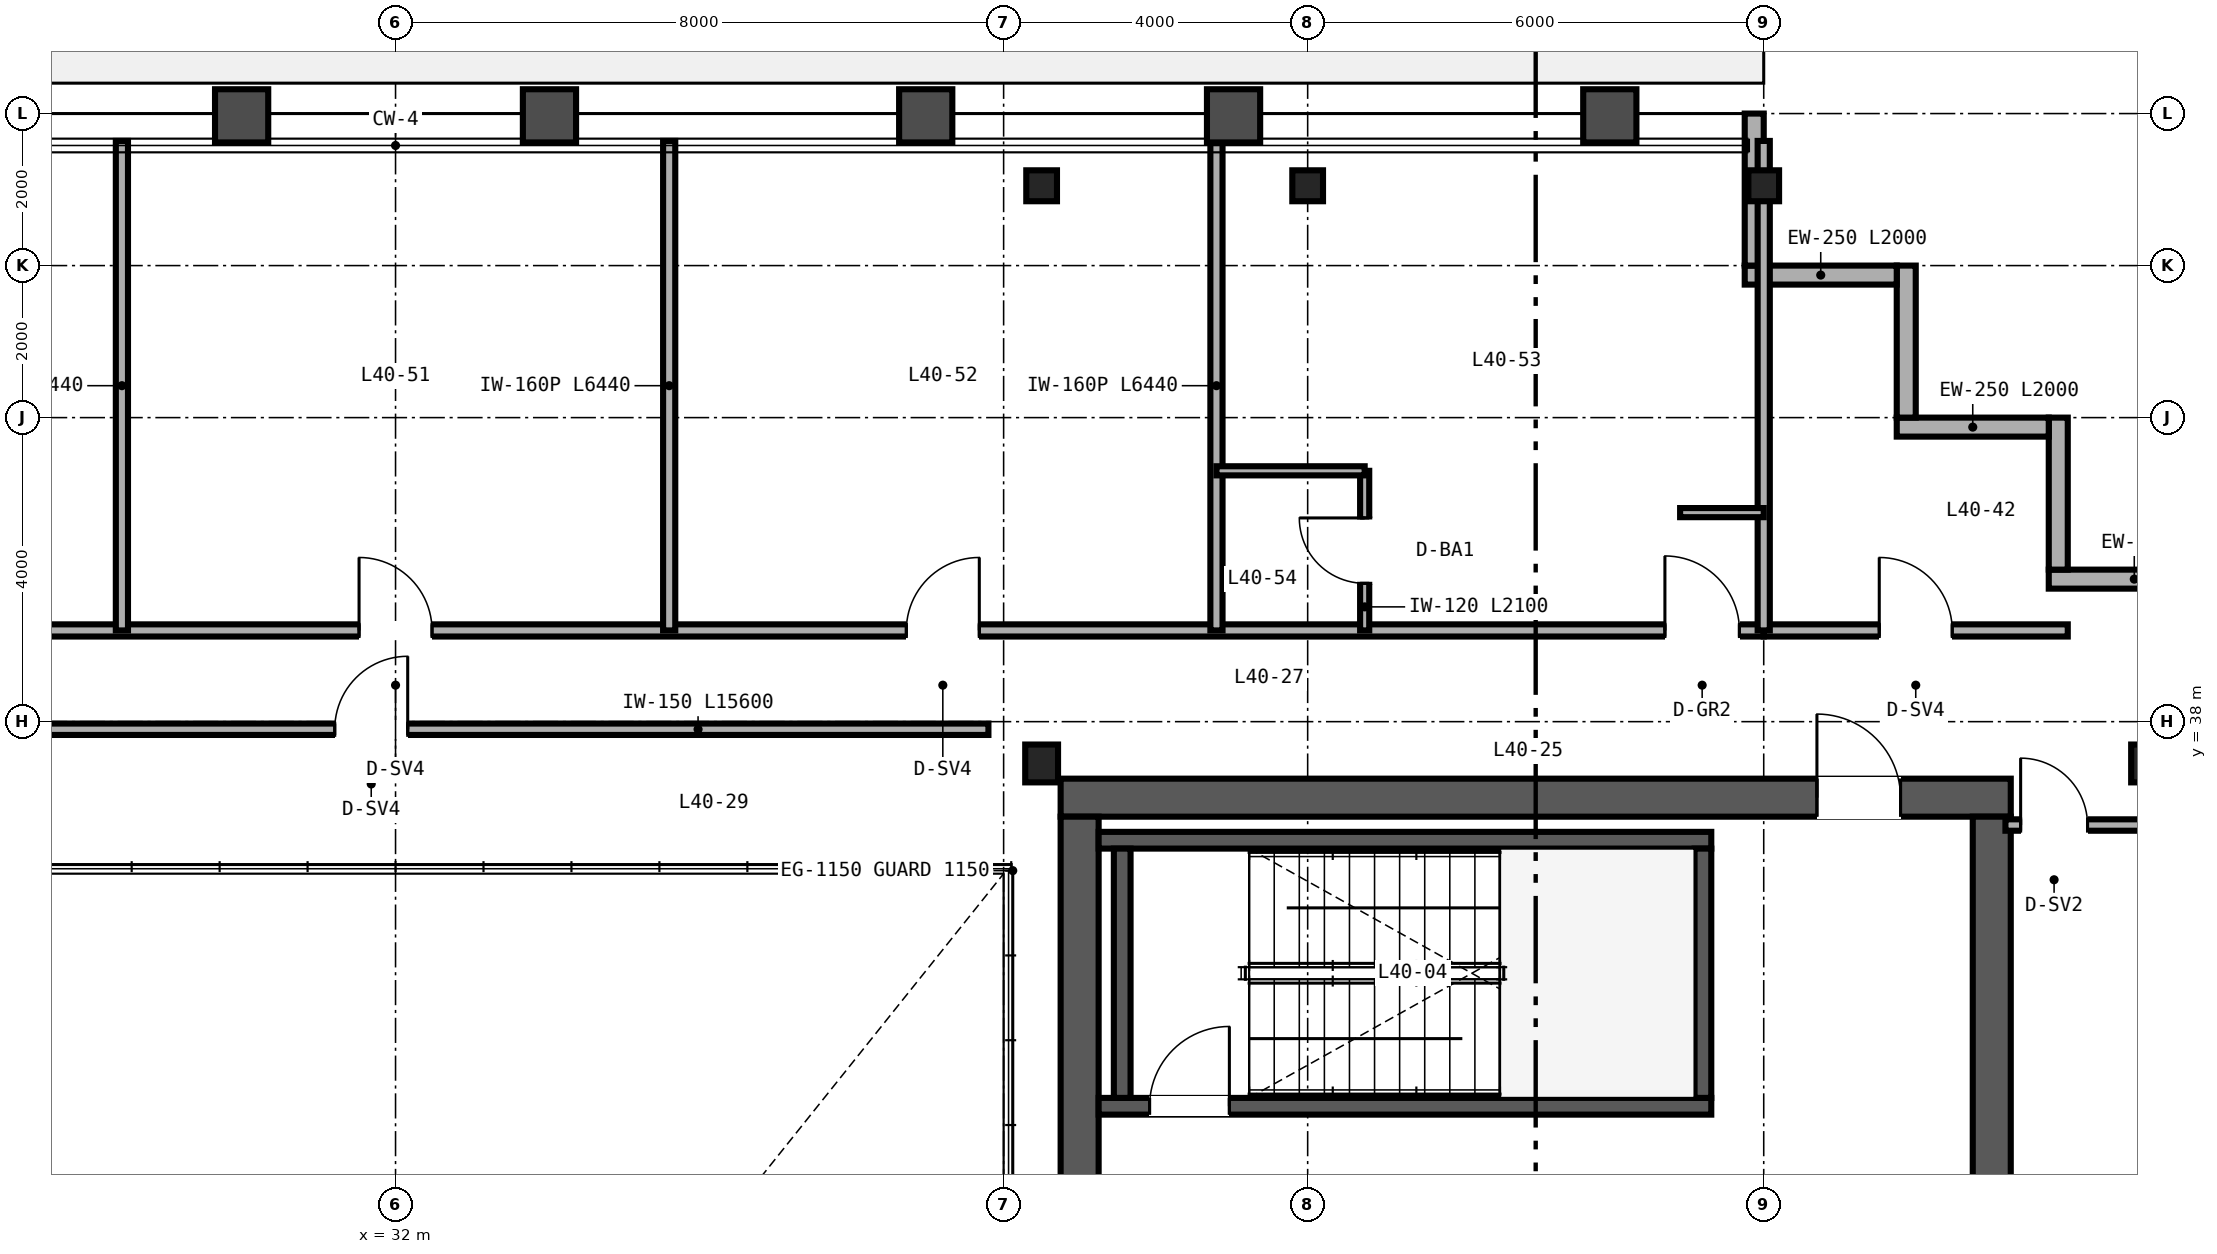
"""IFC4 building model, lengths in metres.
Left out: names, types, materials, properties, quantities, classifications, styles, units other than length and angle.
Written with IfcOpenShell. Run it as: python <this file> out.ifc"""

import sys

from ifc_helpers import new_model, si_unit, direction, frame, frame_2d, origin, origin_2d, place, context, subcontext, project, spatial, rectangle, i_section, extrude, source, transform, mapped, element, fill, save


model = new_model("IFC4")
c1 = context("Model", 3, precision=1e-05, world=origin(), true_north=direction((0.0, 1.0)))
c2 = subcontext(c1, "Body", "Model", "MODEL_VIEW")
j1 = project(units=[si_unit("LENGTHUNIT", "METRE"), si_unit("PLANEANGLEUNIT", "RADIAN")], contexts=[c1])
p1 = place(None, origin())
s1 = spatial("IfcSite", under=j1, at=p1, CompositionType="ELEMENT")
p2 = place(p1, origin())
s2 = spatial("IfcBuilding", under=s1, at=p2, CompositionType="ELEMENT")
p3 = place(p2, frame((0.0, 0.0, 163.2)))
s3 = spatial("IfcBuildingStorey", under=s2, at=p3, CompositionType="ELEMENT", Elevation=163.2)
p4 = place(p3, frame((40.75, 37.0, 0.0), z_axis=(0.0, 0.0, 1.0), x_axis=(1.0, 0.0, 0.0)))
e1 = element("IfcWall", 1, at=p4, inside=s3, PredefinedType="SHEAR", context=c2, shape_type="SweptSolid", body=[
    extrude(rectangle(XDim=12.5, YDim=0.5, at=frame_2d((6.25, 0.0))), origin(), (0.0, 0.0, 1.0), 3.37),
])
p5 = place(p4, frame((9.95, 0.0, 0.0)))
e2 = element("IfcOpeningElement", 2, at=p5, cuts=e1, PredefinedType="OPENING", context=c2, shape_type="SweptSolid", body=[
    extrude(rectangle(XDim=1.1, YDim=2.15, at=frame_2d((0.55, 1.075))), frame((0.0, 0.26, 0.0), z_axis=(0.0, -1.0, 0.0), x_axis=(1.0, 0.0, 0.0)), (0.0, 0.0, 1.0), 0.52),
])
for number, where, z_axis, x_axis in (
    (3, (41.0, 15.25, 0.0), (0.0, 0.0, 1.0), (0.0, 1.0, 0.0)),
    (4, (53.0, 15.25, 0.0), (0.0, 0.0, 1.0), (0.0, 1.0, 0.0)),
):
    element("IfcWall", number, at=place(p3, frame(where, z_axis=z_axis, x_axis=x_axis)), inside=s3, PredefinedType="SHEAR", context=c2, shape_type="SweptSolid", body=[
        extrude(rectangle(XDim=21.5, YDim=0.5, at=frame_2d((10.75, 0.0))), origin(), (0.0, 0.0, 1.0), 3.37),
    ])
p6 = place(p3, frame((41.25, 32.94, 0.0), z_axis=(0.0, 0.0, 1.0), x_axis=(1.0, 0.0, 0.0)))
e5 = element("IfcWall", 5, at=p6, inside=s3, PredefinedType="SHEAR", context=c2, shape_type="SweptSolid", body=[
    extrude(rectangle(XDim=8.06, YDim=0.22, at=frame_2d((4.03, 0.0))), origin(), (0.0, 0.0, 1.0), 3.4),
])
p7 = place(p6, frame((0.67, 0.0, 0.0)))
e6 = element("IfcOpeningElement", 6, at=p7, cuts=e5, PredefinedType="OPENING", context=c2, shape_type="SweptSolid", body=[
    extrude(rectangle(XDim=1.05, YDim=2.15, at=frame_2d((0.525, 1.075))), frame((0.0, 0.12, 0.0), z_axis=(0.0, -1.0, 0.0), x_axis=(1.0, 0.0, 0.0)), (0.0, 0.0, 1.0), 0.24),
])
p8 = place(p3, frame((41.25, 36.44, 0.0), z_axis=(0.0, 0.0, 1.0), x_axis=(1.0, 0.0, 0.0)))
e7 = element("IfcWall", 7, at=p8, inside=s3, PredefinedType="SHEAR", context=c2, shape_type="SweptSolid", body=[
    extrude(rectangle(XDim=8.06, YDim=0.22, at=frame_2d((4.03, 0.0))), origin(), (0.0, 0.0, 1.0), 3.4),
])
for number, where, z_axis, x_axis in (
    (8, (41.56, 33.05, 0.0), (0.0, 0.0, 1.0), (0.0, 1.0, 0.0)),
    (9, (49.2, 33.05, 0.0), (0.0, 0.0, 1.0), (0.0, 1.0, 0.0)),
):
    element("IfcWall", number, at=place(p3, frame(where, z_axis=z_axis, x_axis=x_axis)), inside=s3, PredefinedType="SHEAR", context=c2, shape_type="SweptSolid", body=[
        extrude(rectangle(XDim=3.28, YDim=0.22, at=frame_2d((1.64, 0.0))), origin(), (0.0, 0.0, 1.0), 3.4),
    ])
m1 = source(origin(), c2, "Body", "SweptSolid", [
    extrude(i_section(OverallWidth=0.432, OverallDepth=0.498, WebThickness=0.056, FlangeThickness=0.089, FilletRadius=0.025, at=origin_2d()), origin(), (0.0, 0.0, 1.0), 3.37),
])
for number, where, z_axis, x_axis in (
    (10, (40.5, 37.45, 0.0), (0.0, 0.0, 1.0), (1.0, 0.0, 0.0)),
    (11, (55.05, 37.45, 0.0), (0.0, 0.0, 1.0), (1.0, 0.0, 0.0)),
):
    element("IfcColumn", number, at=place(p3, frame(where, z_axis=z_axis, x_axis=x_axis)), inside=s3, PredefinedType="COLUMN", context=c2, shape_type="MappedRepresentation", body=[
        mapped(m1, transform((0.0, 0.0, 0.0), scale=1.0)),
    ])
m2 = source(origin(), c2, "Body", "SweptSolid", [
    extrude(i_section(OverallWidth=0.404, OverallDepth=0.407, WebThickness=0.027, FlangeThickness=0.044, FilletRadius=0.025, at=origin_2d()), origin(), (0.0, 0.0, 1.0), 3.37),
])
for number, where, z_axis, x_axis in (
    (12, (40.5, 45.05, 0.0), (0.0, 0.0, 1.0), (1.0, 0.0, 0.0)),
    (13, (44.0, 45.05, 0.0), (0.0, 0.0, 1.0), (1.0, 0.0, 0.0)),
    (14, (50.0, 45.05, 0.0), (0.0, 0.0, 1.0), (1.0, 0.0, 0.0)),
):
    element("IfcColumn", number, at=place(p3, frame(where, z_axis=z_axis, x_axis=x_axis)), inside=s3, PredefinedType="COLUMN", context=c2, shape_type="MappedRepresentation", body=[
        mapped(m2, transform((0.0, 0.0, 0.0), scale=1.0)),
    ])
p9 = place(p3, frame((56.0, 39.875, 0.0), z_axis=(0.0, 0.0, 1.0), x_axis=(-1.0, 0.0, 0.0)))
e15 = element("IfcWall", 15, at=p9, inside=s3, PredefinedType="SOLIDWALL", context=c2, shape_type="SweptSolid", body=[
    extrude(rectangle(XDim=2.25, YDim=0.25, at=frame_2d((1.125, 0.0))), origin(), (0.0, 0.0, 1.0), 3.37),
])
for number, where, z_axis, x_axis in (
    (16, (53.875, 40.0, 0.0), (0.0, 0.0, 1.0), (0.0, 1.0, 0.0)),
    (17, (53.75, 41.875, 0.0), (0.0, 0.0, 1.0), (-1.0, 0.0, 0.0)),
    (18, (51.875, 42.0, 0.0), (0.0, 0.0, 1.0), (0.0, 1.0, 0.0)),
    (19, (51.75, 43.875, 0.0), (0.0, 0.0, 1.0), (-1.0, 0.0, 0.0)),
):
    element("IfcWall", number, at=place(p3, frame(where, z_axis=z_axis, x_axis=x_axis)), inside=s3, PredefinedType="SOLIDWALL", context=c2, shape_type="SweptSolid", body=[
        extrude(rectangle(XDim=2.0, YDim=0.25, at=frame_2d((1.0, 0.0))), origin(), (0.0, 0.0, 1.0), 3.37),
    ])
p10 = place(p3, frame((49.875, 44.0, 0.0), z_axis=(0.0, 0.0, 1.0), x_axis=(0.0, 1.0, 0.0)))
e20 = element("IfcWall", 20, at=p10, inside=s3, PredefinedType="SOLIDWALL", context=c2, shape_type="SweptSolid", body=[
    extrude(rectangle(XDim=2.0, YDim=0.25, at=frame_2d((1.0, 0.0))), origin(), (0.0, 0.0, 1.0), 2.677),
])
p11 = place(p3, frame((24.2, 37.9, 0.0), z_axis=(0.0, 0.0, 1.0), x_axis=(1.0, 0.0, 0.0)))
e21 = element("IfcWall", 21, at=p11, inside=s3, PredefinedType="PARTITIONING", context=c2, shape_type="SweptSolid", body=[
    extrude(rectangle(XDim=15.6, YDim=0.15, at=frame_2d((7.8, 0.0))), origin(), (0.0, 0.0, 1.0), 3.37),
])
p12 = place(p11, frame((7.0, 0.0, 0.0)))
e22 = element("IfcOpeningElement", 22, at=p12, cuts=e21, PredefinedType="OPENING", context=c2, shape_type="SweptSolid", body=[
    extrude(rectangle(XDim=0.96, YDim=2.15, at=frame_2d((0.48, 1.075))), frame((0.0, 0.085, 0.0), z_axis=(0.0, -1.0, 0.0), x_axis=(1.0, 0.0, 0.0)), (0.0, 0.0, 1.0), 0.17),
])
p13 = place(p3, frame((53.18, 36.64, 0.0), z_axis=(0.0, 0.0, 1.0), x_axis=(1.0, 0.0, 0.0)))
e23 = element("IfcWall", 23, at=p13, inside=s3, PredefinedType="PARTITIONING", context=c2, shape_type="SweptSolid", body=[
    extrude(rectangle(XDim=2.66, YDim=0.15, at=frame_2d((1.33, 0.0))), origin(), (0.0, 0.0, 1.0), 2.753),
])
p14 = place(p13, frame((0.2, 0.0, 0.0)))
e24 = element("IfcOpeningElement", 24, at=p14, cuts=e23, PredefinedType="OPENING", context=c2, shape_type="SweptSolid", body=[
    extrude(rectangle(XDim=0.88, YDim=2.15, at=frame_2d((0.44, 1.075))), frame((0.0, 0.085, 0.0), z_axis=(0.0, -1.0, 0.0), x_axis=(1.0, 0.0, 0.0)), (0.0, 0.0, 1.0), 0.17),
])
p15 = place(p3, frame((50.0, 39.2, 0.0), z_axis=(0.0, 0.0, 1.0), x_axis=(1.0, 0.0, 0.0)))
e25 = element("IfcWall", 25, at=p15, inside=s3, PredefinedType="PARTITIONING", context=c2, shape_type="SweptSolid", body=[
    extrude(rectangle(XDim=4.0, YDim=0.16, at=frame_2d((2.0, 0.0))), origin(), (0.0, 0.0, 1.0), 3.37),
])
p16 = place(p15, frame((1.52, 0.0, 0.0)))
e26 = element("IfcOpeningElement", 26, at=p16, cuts=e25, PredefinedType="OPENING", context=c2, shape_type="SweptSolid", body=[
    extrude(rectangle(XDim=0.96, YDim=2.15, at=frame_2d((0.48, 1.075))), frame((0.0, 0.09, 0.0), z_axis=(0.0, -1.0, 0.0), x_axis=(1.0, 0.0, 0.0)), (0.0, 0.0, 1.0), 0.18),
])
p17 = place(p3, frame((14.0, 39.2, 0.0), z_axis=(0.0, 0.0, 1.0), x_axis=(1.0, 0.0, 0.0)))
e27 = element("IfcWall", 27, at=p17, inside=s3, PredefinedType="PARTITIONING", context=c2, shape_type="SweptSolid", body=[
    extrude(rectangle(XDim=36.0, YDim=0.16, at=frame_2d((18.0, 0.0))), origin(), (0.0, 0.0, 1.0), 2.913),
])
p18 = place(p17, frame((5.9, 0.0, 0.0)))
e28 = element("IfcOpeningElement", 28, at=p18, cuts=e27, PredefinedType="OPENING", context=c2, shape_type="SweptSolid", body=[
    extrude(rectangle(XDim=0.98, YDim=2.2, at=frame_2d((0.49, 1.1))), frame((0.0, 0.09, 0.0), z_axis=(0.0, -1.0, 0.0), x_axis=(1.0, 0.0, 0.0)), (0.0, 0.0, 1.0), 0.18),
])
p19 = place(p17, frame((10.32, 0.0, 0.0)))
e29 = element("IfcOpeningElement", 29, at=p19, cuts=e27, PredefinedType="OPENING", context=c2, shape_type="SweptSolid", body=[
    extrude(rectangle(XDim=0.96, YDim=2.15, at=frame_2d((0.48, 1.075))), frame((0.0, 0.09, 0.0), z_axis=(0.0, -1.0, 0.0), x_axis=(1.0, 0.0, 0.0)), (0.0, 0.0, 1.0), 0.18),
])
p20 = place(p17, frame((17.52, 0.0, 0.0)))
e30 = element("IfcOpeningElement", 30, at=p20, cuts=e27, PredefinedType="OPENING", context=c2, shape_type="SweptSolid", body=[
    extrude(rectangle(XDim=0.96, YDim=2.15, at=frame_2d((0.48, 1.075))), frame((0.0, 0.09, 0.0), z_axis=(0.0, -1.0, 0.0), x_axis=(1.0, 0.0, 0.0)), (0.0, 0.0, 1.0), 0.18),
])
p21 = place(p17, frame((24.72, 0.0, 0.0)))
e31 = element("IfcOpeningElement", 31, at=p21, cuts=e27, PredefinedType="OPENING", context=c2, shape_type="SweptSolid", body=[
    extrude(rectangle(XDim=0.96, YDim=2.15, at=frame_2d((0.48, 1.075))), frame((0.0, 0.09, 0.0), z_axis=(0.0, -1.0, 0.0), x_axis=(1.0, 0.0, 0.0)), (0.0, 0.0, 1.0), 0.18),
])
p22 = place(p17, frame((34.7, 0.0, 0.0)))
e32 = element("IfcOpeningElement", 32, at=p22, cuts=e27, PredefinedType="OPENING", context=c2, shape_type="SweptSolid", body=[
    extrude(rectangle(XDim=0.98, YDim=2.2, at=frame_2d((0.49, 1.1))), frame((0.0, 0.09, 0.0), z_axis=(0.0, -1.0, 0.0), x_axis=(1.0, 0.0, 0.0)), (0.0, 0.0, 1.0), 0.18),
])
p23 = place(p3, frame((50.0, 39.2, 0.0), z_axis=(0.0, 0.0, 1.0), x_axis=(0.0, 1.0, 0.0)))
e33 = element("IfcWall", 33, at=p23, inside=s3, PredefinedType="PARTITIONING", context=c2, shape_type="SweptSolid", body=[
    extrude(rectangle(XDim=6.44, YDim=0.16, at=frame_2d((3.22, 0.0))), origin(), (0.0, 0.0, 1.0), 2.677),
])
for number, where, z_axis, x_axis in (
    (34, (28.4, 39.2, 0.0), (0.0, 0.0, 1.0), (0.0, 1.0, 0.0)),
    (35, (35.6, 39.2, 0.0), (0.0, 0.0, 1.0), (0.0, 1.0, 0.0)),
):
    element("IfcWall", number, at=place(p3, frame(where, z_axis=z_axis, x_axis=x_axis)), inside=s3, PredefinedType="PARTITIONING", context=c2, shape_type="SweptSolid", body=[
        extrude(rectangle(XDim=6.44, YDim=0.16, at=frame_2d((3.22, 0.0))), origin(), (0.0, 0.0, 1.0), 2.443),
    ])
p24 = place(p3, frame((42.8, 39.2, 0.0), z_axis=(0.0, 0.0, 1.0), x_axis=(0.0, 1.0, 0.0)))
e36 = element("IfcWall", 36, at=p24, inside=s3, PredefinedType="PARTITIONING", context=c2, shape_type="SweptSolid", body=[
    extrude(rectangle(XDim=6.44, YDim=0.16, at=frame_2d((3.22, 0.0))), origin(), (0.0, 0.0, 1.0), 2.833),
])
p25 = place(p3, frame((44.75, 39.2, 0.0), z_axis=(0.0, 0.0, 1.0), x_axis=(0.0, 1.0, 0.0)))
e37 = element("IfcWall", 37, at=p25, inside=s3, PredefinedType="PARTITIONING", context=c2, shape_type="SweptSolid", body=[
    extrude(rectangle(XDim=2.1, YDim=0.12, at=frame_2d((1.05, 0.0))), origin(), (0.0, 0.0, 1.0), 3.37),
])
p26 = place(p25, frame((0.62, 0.0, 0.0)))
e38 = element("IfcOpeningElement", 38, at=p26, cuts=e37, PredefinedType="OPENING", context=c2, shape_type="SweptSolid", body=[
    extrude(rectangle(XDim=0.86, YDim=2.1, at=frame_2d((0.43, 1.05))), frame((0.0, 0.07, 0.0), z_axis=(0.0, -1.0, 0.0), x_axis=(1.0, 0.0, 0.0)), (0.0, 0.0, 1.0), 0.14),
])
p27 = place(p3, frame((42.8, 41.3, 0.0), z_axis=(0.0, 0.0, 1.0), x_axis=(1.0, 0.0, 0.0)))
e39 = element("IfcWall", 39, at=p27, inside=s3, PredefinedType="PARTITIONING", context=c2, shape_type="SweptSolid", body=[
    extrude(rectangle(XDim=1.95, YDim=0.12, at=frame_2d((0.975, 0.0))), origin(), (0.0, 0.0, 1.0), 3.37),
])
p28 = place(p3, frame((48.9, 40.75, 0.0), z_axis=(0.0, 0.0, 1.0), x_axis=(1.0, 0.0, 0.0)))
e40 = element("IfcWall", 40, at=p28, inside=s3, PredefinedType="PARTITIONING", context=c2, shape_type="SweptSolid", body=[
    extrude(rectangle(XDim=1.1, YDim=0.12, at=frame_2d((0.55, 0.0))), origin(), (0.0, 0.0, 1.0), 3.37),
])
m3 = source(origin(), c2, "Body", "SweptSolid", [
    extrude(rectangle(XDim=1.05, YDim=2.15, at=frame_2d((0.525, 1.075))), frame((0.0, 0.025, 0.0), z_axis=(0.0, -1.0, 0.0), x_axis=(1.0, 0.0, 0.0)), (0.0, 0.0, 1.0), 0.05),
])
p29 = place(p7, origin())
e41 = element("IfcDoor", 41, at=p29, inside=s3, OperationType="SINGLE_SWING_RIGHT", PredefinedType="DOOR", context=c2, shape_type="MappedRepresentation", body=[
    mapped(m3, transform((0.0, 0.0, 0.0), scale=1.0)),
])
fill(e6, e41)
m4 = source(origin(), c2, "Body", "SweptSolid", [
    extrude(rectangle(XDim=1.1, YDim=2.15, at=frame_2d((0.55, 1.075))), frame((0.0, 0.025, 0.0), z_axis=(0.0, -1.0, 0.0), x_axis=(1.0, 0.0, 0.0)), (0.0, 0.0, 1.0), 0.05),
])
p30 = place(p5, origin())
e42 = element("IfcDoor", 42, at=p30, inside=s3, OperationType="SINGLE_SWING_LEFT", PredefinedType="DOOR", context=c2, shape_type="MappedRepresentation", body=[
    mapped(m4, transform((0.0, 0.0, 0.0), scale=1.0)),
])
fill(e2, e42)
m5 = source(origin(), c2, "Body", "SweptSolid", [
    extrude(rectangle(XDim=0.96, YDim=2.15, at=frame_2d((0.48, 1.075))), frame((0.0, 0.025, 0.0), z_axis=(0.0, -1.0, 0.0), x_axis=(1.0, 0.0, 0.0)), (0.0, 0.0, 1.0), 0.05),
])
p31 = place(p12, origin())
e43 = element("IfcDoor", 43, at=p31, inside=s3, OperationType="SINGLE_SWING_RIGHT", PredefinedType="DOOR", context=c2, shape_type="MappedRepresentation", body=[
    mapped(m5, transform((0.0, 0.0, 0.0), scale=1.0)),
])
fill(e22, e43)
m6 = source(origin(), c2, "Body", "SweptSolid", [
    extrude(rectangle(XDim=0.88, YDim=2.15, at=frame_2d((0.44, 1.075))), frame((0.0, 0.025, 0.0), z_axis=(0.0, -1.0, 0.0), x_axis=(1.0, 0.0, 0.0)), (0.0, 0.0, 1.0), 0.05),
])
p32 = place(p14, origin())
e44 = element("IfcDoor", 44, at=p32, inside=s3, OperationType="SINGLE_SWING_LEFT", PredefinedType="DOOR", context=c2, shape_type="MappedRepresentation", body=[
    mapped(m6, transform((0.0, 0.0, 0.0), scale=1.0)),
])
fill(e24, e44)
p33 = place(p16, origin())
e45 = element("IfcDoor", 45, at=p33, inside=s3, OperationType="SINGLE_SWING_LEFT", PredefinedType="DOOR", context=c2, shape_type="MappedRepresentation", body=[
    mapped(m5, transform((0.0, 0.0, 0.0), scale=1.0)),
])
fill(e26, e45)
m7 = source(origin(), c2, "Body", "SweptSolid", [
    extrude(rectangle(XDim=0.86, YDim=2.1, at=frame_2d((0.43, 1.05))), frame((0.0, 0.025, 0.0), z_axis=(0.0, -1.0, 0.0), x_axis=(1.0, 0.0, 0.0)), (0.0, 0.0, 1.0), 0.05),
])
p34 = place(p26, origin())
e46 = element("IfcDoor", 46, at=p34, inside=s3, OperationType="SINGLE_SWING_RIGHT", PredefinedType="DOOR", context=c2, shape_type="MappedRepresentation", body=[
    mapped(m7, transform((0.0, 0.0, 0.0), scale=1.0)),
])
fill(e38, e46)
p35 = place(p20, origin())
e47 = element("IfcDoor", 47, at=p35, inside=s3, OperationType="SINGLE_SWING_LEFT", PredefinedType="DOOR", context=c2, shape_type="MappedRepresentation", body=[
    mapped(m5, transform((0.0, 0.0, 0.0), scale=1.0)),
])
fill(e30, e47)
p36 = place(p21, origin())
e48 = element("IfcDoor", 48, at=p36, inside=s3, OperationType="SINGLE_SWING_RIGHT", PredefinedType="DOOR", context=c2, shape_type="MappedRepresentation", body=[
    mapped(m5, transform((0.0, 0.0, 0.0), scale=1.0)),
])
fill(e31, e48)
m8 = source(origin(), c2, "Body", "SweptSolid", [
    extrude(rectangle(XDim=0.98, YDim=2.2, at=frame_2d((0.49, 1.1))), frame((0.0, 0.025, 0.0), z_axis=(0.0, -1.0, 0.0), x_axis=(1.0, 0.0, 0.0)), (0.0, 0.0, 1.0), 0.05),
])
p37 = place(p22, origin())
e49 = element("IfcDoor", 49, at=p37, inside=s3, OperationType="SINGLE_SWING_LEFT", PredefinedType="DOOR", context=c2, shape_type="MappedRepresentation", body=[
    mapped(m8, transform((0.0, 0.0, 0.0), scale=1.0)),
])
fill(e32, e49)
save(model, sys.argv[1])
